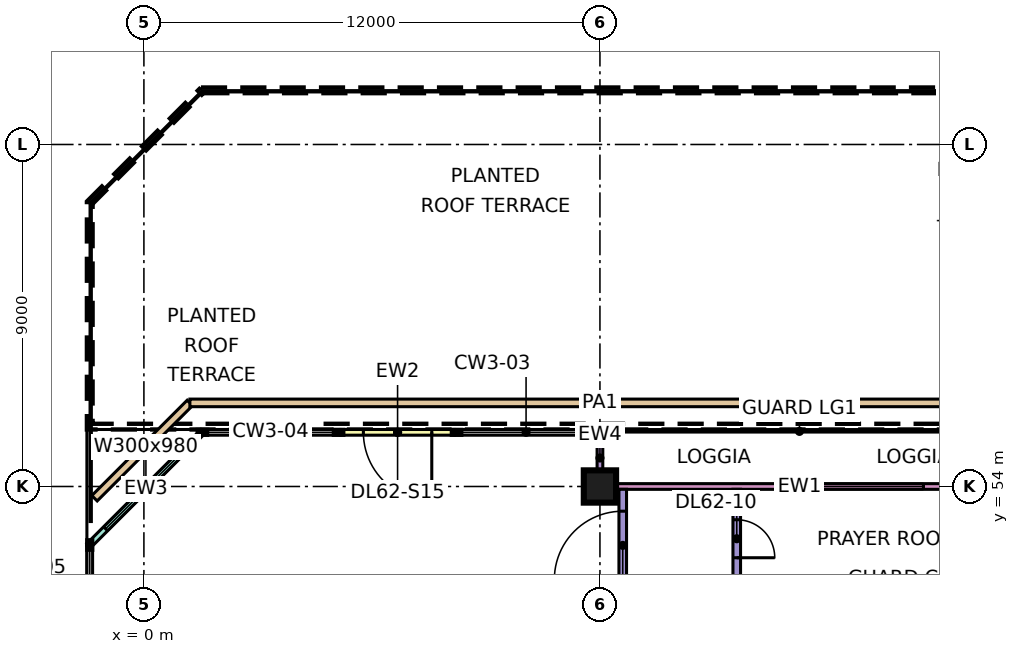
"""IFC4 building model, lengths in metres.
Left out: names, types, materials, properties, quantities, classifications, styles, units other than length and angle.
Written with IfcOpenShell. Run it as: python <this file> out.ifc"""

import sys

from ifc_helpers import new_model, si_unit, direction, frame, frame_2d, origin, origin_2d, place, context, subcontext, project, spatial, rectangle, extrude, element, fill, save


model = new_model("IFC4")
c1 = context("Model", 3, precision=1e-05, world=origin(), true_north=direction((0.0, 1.0)))
c2 = subcontext(c1, "Body", "Model", "MODEL_VIEW")
j1 = project(units=[si_unit("LENGTHUNIT", "METRE"), si_unit("PLANEANGLEUNIT", "RADIAN")], contexts=[c1])
p1 = place(None, origin())
s1 = spatial("IfcSite", under=j1, at=p1, CompositionType="ELEMENT")
p2 = place(p1, origin())
s2 = spatial("IfcBuilding", under=s1, at=p2, CompositionType="ELEMENT")
p3 = place(p2, frame((0.0, 0.0, 262.15)))
s3 = spatial("IfcBuildingStorey", under=s2, at=p3, CompositionType="ELEMENT", Elevation=262.15)
p4 = place(p3, frame((12.0, 54.0, 0.0), z_axis=(0.0, 0.0, 1.0), x_axis=(1.0, 0.0, 0.0)))
e1 = element("IfcColumn", 1, at=p4, inside=s3, PredefinedType="COLUMN", context=c2, shape_type="SweptSolid", body=[
    extrude(rectangle(XDim=0.85, YDim=0.85, at=origin_2d()), origin(), (0.0, 0.0, 1.0), 11.25),
])
p5 = place(p3, frame((22.425, 54.0, 0.0), z_axis=(0.0, 0.0, 1.0), x_axis=(-1.0, 0.0, 0.0)))
e2 = element("IfcWall", 2, at=p5, inside=s3, PredefinedType="SOLIDWALL", context=c2, shape_type="SweptSolid", body=[
    extrude(rectangle(XDim=10.35, YDim=0.15, at=frame_2d((5.175, 0.0))), origin(), (0.0, 0.0, 1.0), 10.85),
])
p6 = place(p5, frame((1.913, 0.0, 0.45)))
e3 = element("IfcOpeningElement", 3, at=p6, cuts=e2, PredefinedType="OPENING", context=c2, shape_type="SweptSolid", body=[
    extrude(rectangle(XDim=3.0, YDim=9.8, at=frame_2d((1.5, 4.9))), frame((0.0, 0.085, 0.0), z_axis=(0.0, -1.0, 0.0), x_axis=(1.0, 0.0, 0.0)), (0.0, 0.0, 1.0), 0.17),
])
p7 = place(p3, frame((12.0, 55.5, 0.0), z_axis=(0.0, 0.0, 1.0), x_axis=(0.0, -1.0, 0.0)))
e4 = element("IfcWall", 4, at=p7, inside=s3, PredefinedType="SOLIDWALL", context=c2, shape_type="SweptSolid", body=[
    extrude(rectangle(XDim=1.5, YDim=0.15, at=frame_2d((0.75, 0.0))), origin(), (0.0, 0.0, 1.0), 10.85),
])
p8 = place(p3, frame((8.175, 55.425, 0.0), z_axis=(0.0, 0.0, 1.0), x_axis=(-1.0, 0.0, 0.0)))
e5 = element("IfcWall", 5, at=p8, inside=s3, PredefinedType="SOLIDWALL", context=c2, shape_type="SweptSolid", body=[
    extrude(rectangle(XDim=3.0, YDim=0.15, at=frame_2d((1.5, 0.0))), origin(), (0.0, 0.0, 1.0), 10.85),
])
p9 = place(p8, frame((0.6, 0.0, 0.0)))
e6 = element("IfcOpeningElement", 6, at=p9, cuts=e5, PredefinedType="OPENING", context=c2, shape_type="SweptSolid", body=[
    extrude(rectangle(XDim=1.8, YDim=2.4, at=frame_2d((0.9, 1.2))), frame((0.0, 0.085, 0.0), z_axis=(0.0, -1.0, 0.0), x_axis=(1.0, 0.0, 0.0)), (0.0, 0.0, 1.0), 0.17),
])
p10 = place(p3, frame((1.553, 55.447, 0.0), z_axis=(0.0, 0.0, 1.0), x_axis=(-0.707106781187, -0.707106781187, 0.0)))
e7 = element("IfcWall", 7, at=p10, inside=s3, PredefinedType="SOLIDWALL", context=c2, shape_type="SweptSolid", body=[
    extrude(rectangle(XDim=4.243, YDim=0.15, at=frame_2d((2.121, 0.0))), origin(), (0.0, 0.0, 1.0), 10.85),
])
p11 = place(p10, frame((0.621, 0.0, 0.45)))
e8 = element("IfcOpeningElement", 8, at=p11, cuts=e7, PredefinedType="OPENING", context=c2, shape_type="SweptSolid", body=[
    extrude(rectangle(XDim=3.0, YDim=9.8, at=frame_2d((1.5, 4.9))), frame((0.0, 0.085, 0.0), z_axis=(0.0, -1.0, 0.0), x_axis=(1.0, 0.0, 0.0)), (0.0, 0.0, 1.0), 0.17),
])
p12 = place(p3, frame((-1.3, 53.69, 0.0), z_axis=(0.0, 0.0, 1.0), x_axis=(0.707106781187, 0.707106781187, 0.0)))
e9 = element("IfcWall", 9, at=p12, inside=s3, PredefinedType="PARAPET", context=c2, shape_type="SweptSolid", body=[
    extrude(rectangle(XDim=3.55, YDim=0.2, at=frame_2d((1.775, 0.0))), origin(), (0.0, 0.0, 1.0), 0.5),
])
p13 = place(p3, frame((1.21, 56.2, 0.0), z_axis=(0.0, 0.0, 1.0), x_axis=(1.0, 0.0, 0.0)))
e10 = element("IfcWall", 10, at=p13, inside=s3, PredefinedType="PARAPET", context=c2, shape_type="SweptSolid", body=[
    extrude(rectangle(XDim=21.58, YDim=0.2, at=frame_2d((10.79, 0.0))), origin(), (0.0, 0.0, 1.0), 0.5),
])
p14 = place(p3, frame((12.6, 22.9, 0.0), z_axis=(0.0, 0.0, 1.0), x_axis=(0.0, 1.0, 0.0)))
e11 = element("IfcWall", 11, at=p14, inside=s3, PredefinedType="PARTITIONING", context=c2, shape_type="SweptSolid", body=[
    extrude(rectangle(XDim=31.026, YDim=0.2, at=frame_2d((15.513, 0.0))), origin(), (0.0, 0.0, 1.0), 10.85),
])
p15 = place(p14, frame((11.45, 0.0, 0.0)))
e12 = element("IfcOpeningElement", 12, at=p15, cuts=e11, PredefinedType="OPENING", context=c2, shape_type="SweptSolid", body=[
    extrude(rectangle(XDim=1.0, YDim=2.1, at=frame_2d((0.5, 1.05))), frame((0.0, 0.11, 0.0), z_axis=(0.0, -1.0, 0.0), x_axis=(1.0, 0.0, 0.0)), (0.0, 0.0, 1.0), 0.22),
])
p16 = place(p14, frame((15.95, 0.0, 0.0)))
e13 = element("IfcOpeningElement", 13, at=p16, cuts=e11, PredefinedType="OPENING", context=c2, shape_type="SweptSolid", body=[
    extrude(rectangle(XDim=1.0, YDim=2.1, at=frame_2d((0.5, 1.05))), frame((0.0, 0.11, 0.0), z_axis=(0.0, -1.0, 0.0), x_axis=(1.0, 0.0, 0.0)), (0.0, 0.0, 1.0), 0.22),
])
p17 = place(p14, frame((23.15, 0.0, 0.0)))
e14 = element("IfcOpeningElement", 14, at=p17, cuts=e11, PredefinedType="OPENING", context=c2, shape_type="SweptSolid", body=[
    extrude(rectangle(XDim=1.8, YDim=2.1, at=frame_2d((0.9, 1.05))), frame((0.0, 0.11, 0.0), z_axis=(0.0, -1.0, 0.0), x_axis=(1.0, 0.0, 0.0)), (0.0, 0.0, 1.0), 0.22),
])
p18 = place(p14, frame((28.65, 0.0, 0.0)))
e15 = element("IfcOpeningElement", 15, at=p18, cuts=e11, PredefinedType="OPENING", context=c2, shape_type="SweptSolid", body=[
    extrude(rectangle(XDim=1.8, YDim=2.1, at=frame_2d((0.9, 1.05))), frame((0.0, 0.11, 0.0), z_axis=(0.0, -1.0, 0.0), x_axis=(1.0, 0.0, 0.0)), (0.0, 0.0, 1.0), 0.22),
])
p19 = place(p3, frame((15.6, 51.225, 0.0), z_axis=(0.0, 0.0, 1.0), x_axis=(0.0, 1.0, 0.0)))
e16 = element("IfcWall", 16, at=p19, inside=s3, PredefinedType="PARTITIONING", context=c2, shape_type="SweptSolid", body=[
    extrude(rectangle(XDim=2.701, YDim=0.2, at=frame_2d((1.351, 0.0))), origin(), (0.0, 0.0, 1.0), 10.85),
])
p20 = place(p19, frame((0.9, 0.0, 0.0)))
e17 = element("IfcOpeningElement", 17, at=p20, cuts=e16, PredefinedType="OPENING", context=c2, shape_type="SweptSolid", body=[
    extrude(rectangle(XDim=1.0, YDim=2.1, at=frame_2d((0.5, 1.05))), frame((0.0, 0.11, 0.0), z_axis=(0.0, -1.0, 0.0), x_axis=(1.0, 0.0, 0.0)), (0.0, 0.0, 1.0), 0.22),
])
p21 = place(p6, origin())
e18 = element("IfcWindow", 18, at=p21, inside=s3, PartitioningType="SINGLE_PANEL", PredefinedType="WINDOW", context=c2, shape_type="SweptSolid", body=[
    extrude(rectangle(XDim=3.0, YDim=9.8, at=frame_2d((1.5, 4.9))), frame((0.0, 0.03, 0.0), z_axis=(0.0, -1.0, 0.0), x_axis=(1.0, 0.0, 0.0)), (0.0, 0.0, 1.0), 0.06),
])
fill(e3, e18)
p22 = place(p9, origin())
e19 = element("IfcDoor", 19, at=p22, inside=s3, OperationType="DOUBLE_DOOR_SINGLE_SWING", PredefinedType="DOOR", context=c2, shape_type="SweptSolid", body=[
    extrude(rectangle(XDim=1.8, YDim=2.4, at=frame_2d((0.9, 1.2))), frame((0.0, 0.025, 0.0), z_axis=(0.0, -1.0, 0.0), x_axis=(1.0, 0.0, 0.0)), (0.0, 0.0, 1.0), 0.05),
])
fill(e6, e19)
p23 = place(p11, origin())
e20 = element("IfcWindow", 20, at=p23, inside=s3, PartitioningType="SINGLE_PANEL", PredefinedType="WINDOW", context=c2, shape_type="SweptSolid", body=[
    extrude(rectangle(XDim=3.0, YDim=9.8, at=frame_2d((1.5, 4.9))), frame((0.0, 0.03, 0.0), z_axis=(0.0, -1.0, 0.0), x_axis=(1.0, 0.0, 0.0)), (0.0, 0.0, 1.0), 0.06),
])
fill(e8, e20)
p24 = place(p20, frame((1.0, 0.0, 0.0), z_axis=(0.0, 0.0, 1.0), x_axis=(-1.0, 0.0, 0.0)))
e21 = element("IfcDoor", 21, at=p24, inside=s3, OperationType="SINGLE_SWING_LEFT", PredefinedType="DOOR", context=c2, shape_type="SweptSolid", body=[
    extrude(rectangle(XDim=1.0, YDim=2.1, at=frame_2d((0.5, 1.05))), frame((0.0, 0.025, 0.0), z_axis=(0.0, -1.0, 0.0), x_axis=(1.0, 0.0, 0.0)), (0.0, 0.0, 1.0), 0.05),
])
fill(e17, e21)
p25 = place(p18, origin())
e22 = element("IfcDoor", 22, at=p25, inside=s3, OperationType="DOUBLE_DOOR_SINGLE_SWING", PredefinedType="DOOR", context=c2, shape_type="SweptSolid", body=[
    extrude(rectangle(XDim=1.8, YDim=2.1, at=frame_2d((0.9, 1.05))), frame((0.0, 0.025, 0.0), z_axis=(0.0, -1.0, 0.0), x_axis=(1.0, 0.0, 0.0)), (0.0, 0.0, 1.0), 0.05),
])
fill(e15, e22)
save(model, sys.argv[1])
